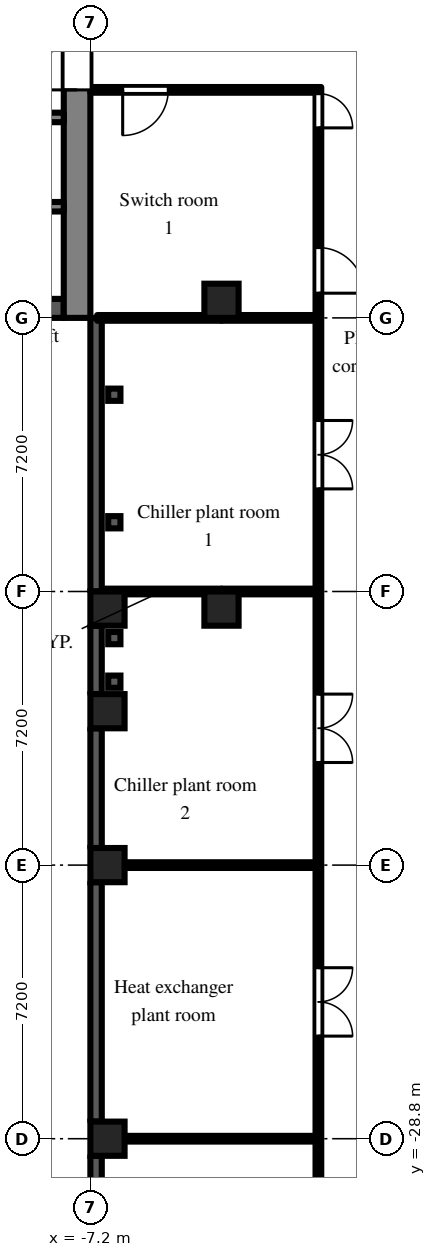
"""IFC4 building model, lengths in metres.
Left out: names, types, materials, properties, quantities, classifications, styles, units other than length and angle.
Written with IfcOpenShell. Run it as: python <this file> out.ifc"""

import sys

from ifc_helpers import new_model, si_unit, direction, frame, frame_2d, origin, origin_2d, place, context, subcontext, project, spatial, polyline, rectangle, outline, extrude, element, fill, save


model = new_model("IFC4")
c1 = context("Model", 3, precision=1e-05, world=origin(), true_north=direction((0.0, 1.0)))
c2 = subcontext(c1, "Body", "Model", "MODEL_VIEW")
j1 = project(units=[si_unit("LENGTHUNIT", "METRE"), si_unit("PLANEANGLEUNIT", "RADIAN")], contexts=[c1])
p1 = place(None, origin())
s1 = spatial("IfcSite", under=j1, at=p1, CompositionType="ELEMENT")
p2 = place(p1, origin())
s2 = spatial("IfcBuilding", under=s1, at=p2, CompositionType="ELEMENT")
p3 = place(p2, frame((0.0, 0.0, 111.9)))
s3 = spatial("IfcBuildingStorey", under=s2, at=p3, CompositionType="ELEMENT", Elevation=111.9)
for number, where, z_axis, x_axis in (
    (1, (-6.75, -28.8, 0.0), (0.0, 0.0, 1.0), (1.0, 0.0, 0.0)),
    (2, (-6.75, -21.6, 0.0), (0.0, 0.0, 1.0), (1.0, 0.0, 0.0)),
    (3, (-6.75, -17.55, 0.0), (0.0, 0.0, 1.0), (1.0, 0.0, 0.0)),
    (4, (-6.75, -14.85, 0.0), (0.0, 0.0, 1.0), (1.0, 0.0, 0.0)),
    (5, (-3.75, -14.85, 0.0), (0.0, 0.0, 1.0), (1.0, 0.0, 0.0)),
    (6, (-3.75, -6.75, 0.0), (0.0, 0.0, 1.0), (1.0, 0.0, 0.0)),
):
    element("IfcColumn", number, at=place(p3, frame(where, z_axis=z_axis, x_axis=x_axis)), inside=s3, PredefinedType="COLUMN", context=c2, shape_type="SweptSolid", body=[
        extrude(rectangle(XDim=0.9, YDim=0.9, at=origin_2d()), origin(), (0.0, 0.0, 1.0), 4.2),
    ])
p4 = place(p3, frame((-7.05, -7.2, 0.0), z_axis=(0.0, 0.0, 1.0), x_axis=(0.0, -1.0, 0.0)))
e7 = element("IfcWall", 7, at=p4, inside=s3, PredefinedType="SOLIDWALL", context=c2, shape_type="SweptSolid", body=[
    extrude(rectangle(XDim=7.2, YDim=0.3, at=frame_2d((3.6, 0.0))), origin(), (0.0, 0.0, 1.0), 3.8),
])
p5 = place(p3, frame((-7.05, -15.3, 0.0), z_axis=(0.0, 0.0, 1.0), x_axis=(0.0, -1.0, 0.0)))
e8 = element("IfcWall", 8, at=p5, inside=s3, PredefinedType="SOLIDWALL", context=c2, shape_type="SweptSolid", body=[
    extrude(rectangle(XDim=1.8, YDim=0.3, at=frame_2d((0.9, 0.0))), origin(), (0.0, 0.0, 1.0), 3.4),
])
p6 = place(p3, frame((-7.05, -18.0, 0.0), z_axis=(0.0, 0.0, 1.0), x_axis=(0.0, -1.0, 0.0)))
e9 = element("IfcWall", 9, at=p6, inside=s3, PredefinedType="SOLIDWALL", context=c2, shape_type="SweptSolid", body=[
    extrude(rectangle(XDim=3.15, YDim=0.3, at=frame_2d((1.575, 0.0))), origin(), (0.0, 0.0, 1.0), 3.8),
])
p7 = place(p3, frame((-7.05, -22.05, 0.0), z_axis=(0.0, 0.0, 1.0), x_axis=(0.0, -1.0, 0.0)))
e10 = element("IfcWall", 10, at=p7, inside=s3, PredefinedType="SOLIDWALL", context=c2, shape_type="SweptSolid", body=[
    extrude(outline(polyline([(0.0, 0.0), (6.3, 0.0), (6.3, 3.8), (1.952, 3.8), (1.95, 3.4), (1.15, 3.4), (1.148, 3.8), (0.0, 3.8), (0.0, 0.0)])), frame((0.0, 0.15, 0.0), z_axis=(0.0, -1.0, 0.0), x_axis=(1.0, 0.0, 0.0)), (0.0, 0.0, 1.0), 0.3),
])
p8 = place(p3, frame((-7.05, -29.25, 0.0), z_axis=(0.0, 0.0, 1.0), x_axis=(0.0, -1.0, 0.0)))
e11 = element("IfcWall", 11, at=p8, inside=s3, PredefinedType="SOLIDWALL", context=c2, shape_type="SweptSolid", body=[
    extrude(rectangle(XDim=6.3, YDim=0.3, at=frame_2d((3.15, 0.0))), origin(), (0.0, 0.0, 1.0), 3.8),
])
p9 = place(p3, frame((-7.55, -7.2, 0.0), z_axis=(0.0, 0.0, 1.0), x_axis=(0.0, 1.0, 0.0)))
e12 = element("IfcWall", 12, at=p9, inside=s3, PredefinedType="SHEAR", context=c2, shape_type="SweptSolid", body=[
    extrude(rectangle(XDim=14.4, YDim=0.7, at=frame_2d((7.2, 0.0))), origin(), (0.0, 0.0, 1.0), 3.8),
])
p10 = place(p9, frame((6.0, 0.0, 0.0)))
e13 = element("IfcOpeningElement", 13, at=p10, cuts=e12, PredefinedType="OPENING", context=c2, shape_type="SweptSolid", body=[
    extrude(rectangle(XDim=2.4, YDim=2.2, at=frame_2d((1.2, 1.1))), frame((0.0, 0.36, 0.0), z_axis=(0.0, -1.0, 0.0), x_axis=(1.0, 0.0, 0.0)), (0.0, 0.0, 1.0), 0.72),
])
p11 = place(p3, frame((-7.9, -6.95, 0.0), z_axis=(0.0, 0.0, 1.0), x_axis=(-1.0, 0.0, 0.0)))
e14 = element("IfcWall", 14, at=p11, inside=s3, PredefinedType="SHEAR", context=c2, shape_type="SweptSolid", body=[
    extrude(rectangle(XDim=12.95, YDim=0.5, at=frame_2d((6.475, 0.0))), origin(), (0.0, 0.0, 1.0), 3.8),
])
p12 = place(p3, frame((-7.9, -1.925, 0.0), z_axis=(0.0, 0.0, 1.0), x_axis=(-1.0, 0.0, 0.0)))
e15 = element("IfcWall", 15, at=p12, inside=s3, PredefinedType="SHEAR", context=c2, shape_type="SweptSolid", body=[
    extrude(rectangle(XDim=12.95, YDim=0.25, at=frame_2d((6.475, 0.0))), origin(), (0.0, 0.0, 1.0), 3.8),
])
p13 = place(p12, frame((4.825, 0.0, 0.0)))
e16 = element("IfcOpeningElement", 16, at=p13, cuts=e15, PredefinedType="OPENING", context=c2, shape_type="SweptSolid", body=[
    extrude(rectangle(XDim=1.1, YDim=2.1, at=frame_2d((0.55, 1.05))), frame((0.0, 0.135, 0.0), z_axis=(0.0, -1.0, 0.0), x_axis=(1.0, 0.0, 0.0)), (0.0, 0.0, 1.0), 0.27),
])
p14 = place(p12, frame((7.025, 0.0, 0.0)))
e17 = element("IfcOpeningElement", 17, at=p14, cuts=e15, PredefinedType="OPENING", context=c2, shape_type="SweptSolid", body=[
    extrude(rectangle(XDim=1.1, YDim=2.1, at=frame_2d((0.55, 1.05))), frame((0.0, 0.135, 0.0), z_axis=(0.0, -1.0, 0.0), x_axis=(1.0, 0.0, 0.0)), (0.0, 0.0, 1.0), 0.27),
])
p15 = place(p12, frame((9.225, 0.0, 0.0)))
e18 = element("IfcOpeningElement", 18, at=p15, cuts=e15, PredefinedType="OPENING", context=c2, shape_type="SweptSolid", body=[
    extrude(rectangle(XDim=1.1, YDim=2.1, at=frame_2d((0.55, 1.05))), frame((0.0, 0.135, 0.0), z_axis=(0.0, -1.0, 0.0), x_axis=(1.0, 0.0, 0.0)), (0.0, 0.0, 1.0), 0.27),
])
p16 = place(p12, frame((0.525, 0.0, 0.0)))
e19 = element("IfcOpeningElement", 19, at=p16, cuts=e15, PredefinedType="OPENING", context=c2, shape_type="SweptSolid", body=[
    extrude(rectangle(XDim=0.9, YDim=2.1, at=frame_2d((0.45, 1.05))), frame((0.0, 0.135, 0.0), z_axis=(0.0, -1.0, 0.0), x_axis=(1.0, 0.0, 0.0)), (0.0, 0.0, 1.0), 0.27),
])
p17 = place(p12, frame((2.625, 0.0, 0.0)))
e20 = element("IfcOpeningElement", 20, at=p17, cuts=e15, PredefinedType="OPENING", context=c2, shape_type="SweptSolid", body=[
    extrude(rectangle(XDim=1.1, YDim=2.1, at=frame_2d((0.55, 1.05))), frame((0.0, 0.135, 0.0), z_axis=(0.0, -1.0, 0.0), x_axis=(1.0, 0.0, 0.0)), (0.0, 0.0, 1.0), 0.27),
])
p18 = place(p3, frame((-7.9, -4.275, 0.0), z_axis=(0.0, 0.0, 1.0), x_axis=(-1.0, 0.0, 0.0)))
e21 = element("IfcWall", 21, at=p18, inside=s3, PredefinedType="SHEAR", context=c2, shape_type="SweptSolid", body=[
    extrude(rectangle(XDim=1.95, YDim=0.25, at=frame_2d((0.975, 0.0))), origin(), (0.0, 0.0, 1.0), 3.8),
])
p19 = place(p3, frame((-7.2, -1.2, 0.0), z_axis=(0.0, 0.0, 1.0), x_axis=(1.0, 0.0, 0.0)))
e22 = element("IfcWall", 22, at=p19, inside=s3, PredefinedType="PARTITIONING", context=c2, shape_type="SweptSolid", body=[
    extrude(rectangle(XDim=5.925, YDim=0.15, at=frame_2d((2.962, 0.0))), origin(), (0.0, 0.0, 1.0), 3.8),
])
p20 = place(p19, frame((0.85, 0.0, 0.0)))
e23 = element("IfcOpeningElement", 23, at=p20, cuts=e22, PredefinedType="OPENING", context=c2, shape_type="SweptSolid", body=[
    extrude(rectangle(XDim=1.2, YDim=2.1, at=frame_2d((0.6, 1.05))), frame((0.0, 0.085, 0.0), z_axis=(0.0, -1.0, 0.0), x_axis=(1.0, 0.0, 0.0)), (0.0, 0.0, 1.0), 0.17),
])
p21 = place(p3, frame((-6.9, -28.8, 0.0), z_axis=(0.0, 0.0, 1.0), x_axis=(1.0, 0.0, 0.0)))
e24 = element("IfcWall", 24, at=p21, inside=s3, PredefinedType="PARTITIONING", context=c2, shape_type="SweptSolid", body=[
    extrude(rectangle(XDim=5.625, YDim=0.15, at=frame_2d((2.812, 0.0))), origin(), (0.0, 0.0, 1.0), 3.8),
])
p22 = place(p3, frame((-6.9, -21.6, 0.0), z_axis=(0.0, 0.0, 1.0), x_axis=(1.0, 0.0, 0.0)))
e25 = element("IfcWall", 25, at=p22, inside=s3, PredefinedType="PARTITIONING", context=c2, shape_type="SweptSolid", body=[
    extrude(rectangle(XDim=5.625, YDim=0.15, at=frame_2d((2.812, 0.0))), origin(), (0.0, 0.0, 1.0), 2.2),
])
p23 = place(p3, frame((-6.9, -14.4, 0.0), z_axis=(0.0, 0.0, 1.0), x_axis=(1.0, 0.0, 0.0)))
e26 = element("IfcWall", 26, at=p23, inside=s3, PredefinedType="PARTITIONING", context=c2, shape_type="SweptSolid", body=[
    extrude(rectangle(XDim=3.15, YDim=0.15, at=frame_2d((1.575, 0.0))), origin(), (0.0, 0.0, 1.0), 3.4),
])
p24 = place(p3, frame((-7.02, -7.2, 0.0), z_axis=(0.0, 0.0, 1.0), x_axis=(1.0, 0.0, 0.0)))
e27 = element("IfcWall", 27, at=p24, inside=s3, PredefinedType="PARTITIONING", context=c2, shape_type="SweptSolid", body=[
    extrude(rectangle(XDim=3.27, YDim=0.15, at=frame_2d((1.635, 0.0))), origin(), (0.0, 0.0, 1.0), 3.4),
])
p25 = place(p3, frame((-1.2, -36.5, 0.0), z_axis=(0.0, 0.0, 1.0), x_axis=(0.0, 1.0, 0.0)))
e28 = element("IfcWall", 28, at=p25, inside=s3, PredefinedType="PARTITIONING", context=c2, shape_type="SweptSolid", body=[
    extrude(outline(polyline([(0.0, 0.0), (35.375, 0.0), (35.375, 3.8), (13.302, 3.8), (13.3, 3.4), (12.5, 3.4), (12.498, 3.8), (0.0, 3.8), (0.0, 0.0)])), frame((0.0, 0.075, 0.0), z_axis=(0.0, -1.0, 0.0), x_axis=(1.0, 0.0, 0.0)), (0.0, 0.0, 1.0), 0.15),
])
p26 = place(p25, frame((29.95, 0.0, 0.0)))
e29 = element("IfcOpeningElement", 29, at=p26, cuts=e28, PredefinedType="OPENING", context=c2, shape_type="SweptSolid", body=[
    extrude(rectangle(XDim=1.2, YDim=2.1, at=frame_2d((0.6, 1.05))), frame((0.0, 0.085, 0.0), z_axis=(0.0, -1.0, 0.0), x_axis=(1.0, 0.0, 0.0)), (0.0, 0.0, 1.0), 0.17),
])
p27 = place(p25, frame((34.3, 0.0, 0.0)))
e30 = element("IfcOpeningElement", 30, at=p27, cuts=e28, PredefinedType="OPENING", context=c2, shape_type="SweptSolid", body=[
    extrude(rectangle(XDim=0.9, YDim=2.1, at=frame_2d((0.45, 1.05))), frame((0.0, 0.085, 0.0), z_axis=(0.0, -1.0, 0.0), x_axis=(1.0, 0.0, 0.0)), (0.0, 0.0, 1.0), 0.17),
])
p28 = place(p25, frame((24.8, 0.0, 0.0)))
e31 = element("IfcOpeningElement", 31, at=p28, cuts=e28, PredefinedType="OPENING", context=c2, shape_type="SweptSolid", body=[
    extrude(rectangle(XDim=1.8, YDim=2.1, at=frame_2d((0.9, 1.05))), frame((0.0, 0.085, 0.0), z_axis=(0.0, -1.0, 0.0), x_axis=(1.0, 0.0, 0.0)), (0.0, 0.0, 1.0), 0.17),
])
p29 = place(p25, frame((17.6, 0.0, 0.0)))
e32 = element("IfcOpeningElement", 32, at=p29, cuts=e28, PredefinedType="OPENING", context=c2, shape_type="SweptSolid", body=[
    extrude(rectangle(XDim=1.8, YDim=2.1, at=frame_2d((0.9, 1.05))), frame((0.0, 0.085, 0.0), z_axis=(0.0, -1.0, 0.0), x_axis=(1.0, 0.0, 0.0)), (0.0, 0.0, 1.0), 0.17),
])
p30 = place(p25, frame((10.4, 0.0, 0.0)))
e33 = element("IfcOpeningElement", 33, at=p30, cuts=e28, PredefinedType="OPENING", context=c2, shape_type="SweptSolid", body=[
    extrude(rectangle(XDim=1.8, YDim=2.1, at=frame_2d((0.9, 1.05))), frame((0.0, 0.085, 0.0), z_axis=(0.0, -1.0, 0.0), x_axis=(1.0, 0.0, 0.0)), (0.0, 0.0, 1.0), 0.17),
])
p31 = place(p25, frame((2.95, 0.0, 0.0)))
e34 = element("IfcOpeningElement", 34, at=p31, cuts=e28, PredefinedType="OPENING", context=c2, shape_type="SweptSolid", body=[
    extrude(rectangle(XDim=1.8, YDim=2.1, at=frame_2d((0.9, 1.05))), frame((0.0, 0.085, 0.0), z_axis=(0.0, -1.0, 0.0), x_axis=(1.0, 0.0, 0.0)), (0.0, 0.0, 1.0), 0.17),
])
for number, where, z_axis, x_axis in (
    (35, (-3.75, -14.4, 0.0), (0.0, 0.0, 1.0), (1.0, 0.0, 0.0)),
    (36, (-3.75, -7.2, 0.0), (0.0, 0.0, 1.0), (1.0, 0.0, 0.0)),
):
    element("IfcWall", number, at=place(p3, frame(where, z_axis=z_axis, x_axis=x_axis)), inside=s3, PredefinedType="PARTITIONING", context=c2, shape_type="SweptSolid", body=[
        extrude(rectangle(XDim=2.475, YDim=0.15, at=frame_2d((1.238, 0.0))), origin(), (0.0, 0.0, 1.0), 3.8),
    ])
p32 = place(p10, origin())
e37 = element("IfcDoor", 37, at=p32, inside=s3, OperationType="DOUBLE_DOOR_DOUBLE_SWING", PredefinedType="DOOR", context=c2, shape_type="SweptSolid", body=[
    extrude(rectangle(XDim=2.4, YDim=2.2, at=frame_2d((1.2, 1.1))), frame((0.0, 0.025, 0.0), z_axis=(0.0, -1.0, 0.0), x_axis=(1.0, 0.0, 0.0)), (0.0, 0.0, 1.0), 0.05),
])
fill(e13, e37)
p33 = place(p20, frame((1.2, 0.0, 0.0), z_axis=(0.0, 0.0, 1.0), x_axis=(-1.0, 0.0, 0.0)))
e38 = element("IfcDoor", 38, at=p33, inside=s3, OperationType="SINGLE_SWING_RIGHT", PredefinedType="DOOR", context=c2, shape_type="SweptSolid", body=[
    extrude(rectangle(XDim=1.2, YDim=2.1, at=frame_2d((0.6, 1.05))), frame((0.0, 0.025, 0.0), z_axis=(0.0, -1.0, 0.0), x_axis=(1.0, 0.0, 0.0)), (0.0, 0.0, 1.0), 0.05),
])
fill(e23, e38)
p34 = place(p26, frame((1.2, 0.0, 0.0), z_axis=(0.0, 0.0, 1.0), x_axis=(-1.0, 0.0, 0.0)))
e39 = element("IfcDoor", 39, at=p34, inside=s3, OperationType="SINGLE_SWING_RIGHT", PredefinedType="DOOR", context=c2, shape_type="SweptSolid", body=[
    extrude(rectangle(XDim=1.2, YDim=2.1, at=frame_2d((0.6, 1.05))), frame((0.0, 0.025, 0.0), z_axis=(0.0, -1.0, 0.0), x_axis=(1.0, 0.0, 0.0)), (0.0, 0.0, 1.0), 0.05),
])
fill(e29, e39)
p35 = place(p27, frame((0.9, 0.0, 0.0), z_axis=(0.0, 0.0, 1.0), x_axis=(-1.0, 0.0, 0.0)))
e40 = element("IfcDoor", 40, at=p35, inside=s3, OperationType="SINGLE_SWING_RIGHT", PredefinedType="DOOR", context=c2, shape_type="SweptSolid", body=[
    extrude(rectangle(XDim=0.9, YDim=2.1, at=frame_2d((0.45, 1.05))), frame((0.0, 0.025, 0.0), z_axis=(0.0, -1.0, 0.0), x_axis=(1.0, 0.0, 0.0)), (0.0, 0.0, 1.0), 0.05),
])
fill(e30, e40)
p36 = place(p28, frame((1.8, 0.0, 0.0), z_axis=(0.0, 0.0, 1.0), x_axis=(-1.0, 0.0, 0.0)))
e41 = element("IfcDoor", 41, at=p36, inside=s3, OperationType="DOUBLE_DOOR_DOUBLE_SWING", PredefinedType="DOOR", context=c2, shape_type="SweptSolid", body=[
    extrude(rectangle(XDim=1.8, YDim=2.1, at=frame_2d((0.9, 1.05))), frame((0.0, 0.025, 0.0), z_axis=(0.0, -1.0, 0.0), x_axis=(1.0, 0.0, 0.0)), (0.0, 0.0, 1.0), 0.05),
])
fill(e31, e41)
p37 = place(p29, frame((1.8, 0.0, 0.0), z_axis=(0.0, 0.0, 1.0), x_axis=(-1.0, 0.0, 0.0)))
e42 = element("IfcDoor", 42, at=p37, inside=s3, OperationType="DOUBLE_DOOR_DOUBLE_SWING", PredefinedType="DOOR", context=c2, shape_type="SweptSolid", body=[
    extrude(rectangle(XDim=1.8, YDim=2.1, at=frame_2d((0.9, 1.05))), frame((0.0, 0.025, 0.0), z_axis=(0.0, -1.0, 0.0), x_axis=(1.0, 0.0, 0.0)), (0.0, 0.0, 1.0), 0.05),
])
fill(e32, e42)
p38 = place(p30, frame((1.8, 0.0, 0.0), z_axis=(0.0, 0.0, 1.0), x_axis=(-1.0, 0.0, 0.0)))
e43 = element("IfcDoor", 43, at=p38, inside=s3, OperationType="DOUBLE_DOOR_DOUBLE_SWING", PredefinedType="DOOR", context=c2, shape_type="SweptSolid", body=[
    extrude(rectangle(XDim=1.8, YDim=2.1, at=frame_2d((0.9, 1.05))), frame((0.0, 0.025, 0.0), z_axis=(0.0, -1.0, 0.0), x_axis=(1.0, 0.0, 0.0)), (0.0, 0.0, 1.0), 0.05),
])
fill(e33, e43)
save(model, sys.argv[1])
